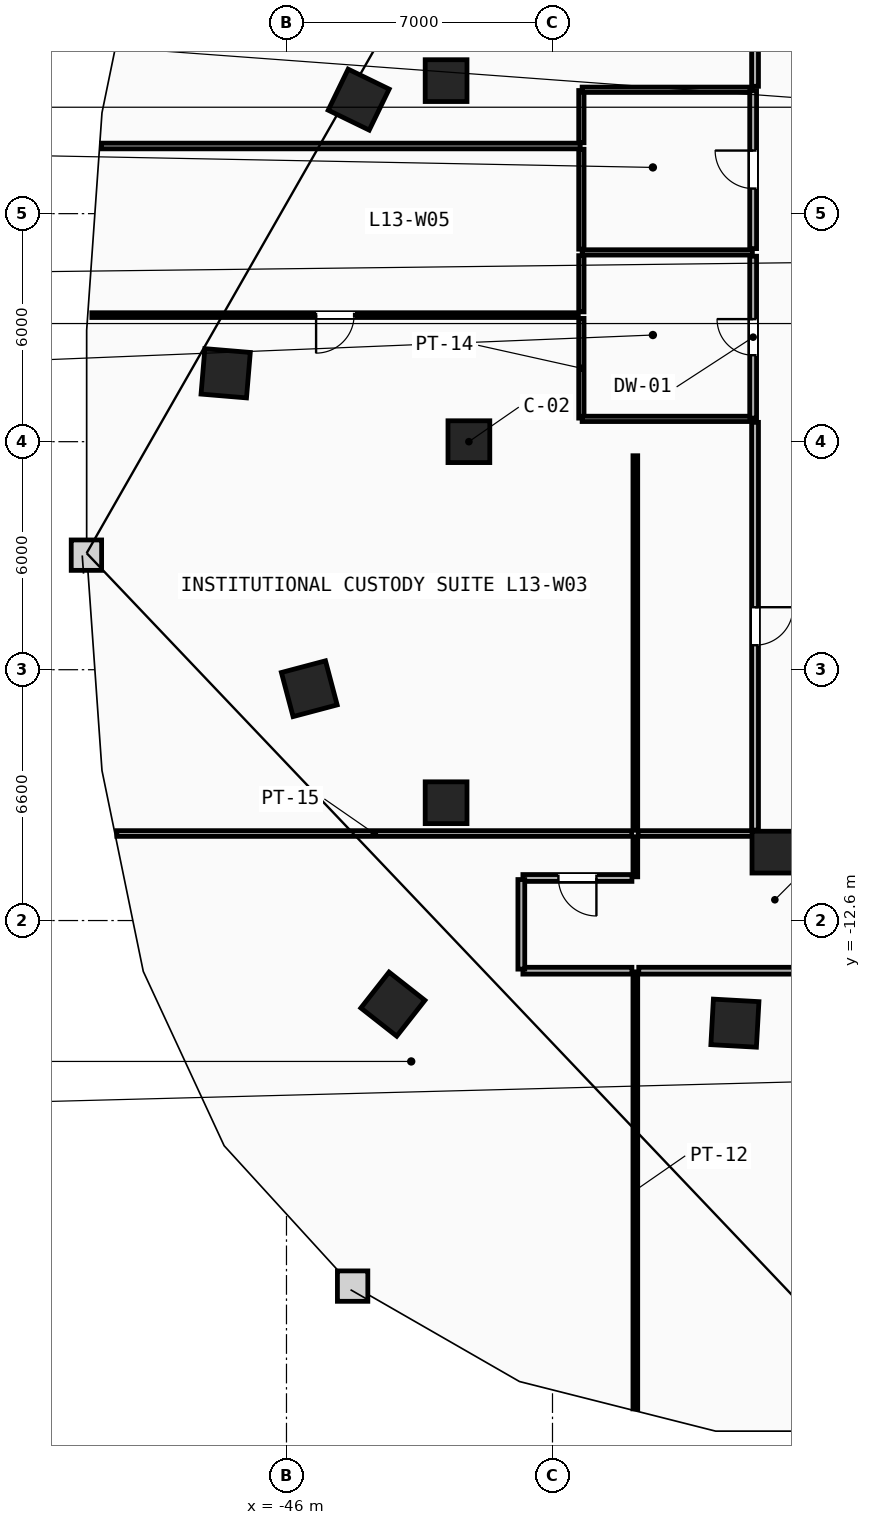
"""IFC4 building model, lengths in metres.
Left out: names, types, materials, properties, quantities, classifications, styles, units other than length and angle.
Written with IfcOpenShell. Run it as: python <this file> out.ifc"""

import sys

from ifc_helpers import new_model, si_unit, direction, frame, frame_2d, origin, origin_2d, place, context, subcontext, project, spatial, rectangle, extrude, element, fill, save


model = new_model("IFC4")
c1 = context("Model", 3, precision=1e-05, world=origin(), true_north=direction((0.0, 1.0)))
c2 = subcontext(c1, "Body", "Model", "MODEL_VIEW")
j1 = project(units=[si_unit("LENGTHUNIT", "METRE"), si_unit("PLANEANGLEUNIT", "RADIAN")], contexts=[c1])
p1 = place(None, origin())
s1 = spatial("IfcSite", under=j1, at=p1, CompositionType="ELEMENT")
p2 = place(p1, origin())
s2 = spatial("IfcBuilding", under=s1, at=p2, CompositionType="ELEMENT")
p3 = place(p2, frame((0.0, 0.0, 54.4)))
s3 = spatial("IfcBuildingStorey", under=s2, at=p3, CompositionType="ELEMENT", Elevation=54.4)
for number, where, z_axis, x_axis in (
    (1, (-41.2, 0.0, 0.0), (0.0, 0.0, 1.0), (1.0, 0.0, 0.0)),
    (2, (-41.8, 9.5, 0.0), (0.0, 0.0, 1.0), (1.0, 0.0, 0.0)),
    (3, (-41.8, -9.5, 0.0), (0.0, 0.0, 1.0), (1.0, 0.0, 0.0)),
    (4, (-33.2, -10.8, 0.0), (0.0, 0.0, 1.0), (1.0, 0.0, 0.0)),
):
    element("IfcColumn", number, at=place(p3, frame(where, z_axis=z_axis, x_axis=x_axis)), inside=s3, PredefinedType="COLUMN", context=c2, shape_type="SweptSolid", body=[
        extrude(rectangle(XDim=1.1, YDim=1.1, at=origin_2d()), origin(), (0.0, 0.0, 1.0), 3.8),
    ])
for number, where, z_axis, x_axis in (
    (5, (-44.1, 9.0, 0.0), (0.0, 0.0, 1.0), (-0.437, -0.899, 0.0)),
    (6, (-47.6, 1.8, 0.0), (0.0, 0.0, 1.0), (-0.084, -0.997, 0.0)),
    (7, (-45.4, -6.5, 0.0), (0.0, 0.0, 1.0), (0.256, -0.967, 0.0)),
    (8, (-43.2, -14.8, 0.0), (0.0, 0.0, 1.0), (0.786, -0.618, 0.0)),
    (9, (-34.2, -15.3, 0.0), (0.0, 0.0, 1.0), (0.998, -0.055, 0.0)),
):
    element("IfcColumn", number, at=place(p3, frame(where, z_axis=z_axis, x_axis=x_axis)), inside=s3, PredefinedType="COLUMN", context=c2, shape_type="SweptSolid", body=[
        extrude(rectangle(XDim=1.2, YDim=1.2, at=origin_2d()), origin(), (0.0, 0.0, 1.0), 3.8),
    ])
p4 = place(p3, frame((-38.24, 0.62, 0.0), z_axis=(0.0, 0.0, 1.0), x_axis=(0.0, 1.0, 0.0)))
e10 = element("IfcWall", 10, at=p4, inside=s3, PredefinedType="PARTITIONING", context=c2, shape_type="SweptSolid", body=[
    extrude(rectangle(XDim=2.625, YDim=0.14, at=frame_2d((1.312, 0.0))), origin(), (0.0, 0.0, 1.0), 3.5),
])
p5 = place(p3, frame((-38.24, 3.415, 0.0), z_axis=(0.0, 0.0, 1.0), x_axis=(0.0, 1.0, 0.0)))
e11 = element("IfcWall", 11, at=p5, inside=s3, PredefinedType="PARTITIONING", context=c2, shape_type="SweptSolid", body=[
    extrude(rectangle(XDim=1.48, YDim=0.14, at=frame_2d((0.74, 0.0))), origin(), (0.0, 0.0, 1.0), 3.5),
])
p6 = place(p3, frame((-38.24, 5.065, 0.0), z_axis=(0.0, 0.0, 1.0), x_axis=(0.0, 1.0, 0.0)))
e12 = element("IfcWall", 12, at=p6, inside=s3, PredefinedType="PARTITIONING", context=c2, shape_type="SweptSolid", body=[
    extrude(rectangle(XDim=2.63, YDim=0.14, at=frame_2d((1.315, 0.0))), origin(), (0.0, 0.0, 1.0), 3.5),
])
p7 = place(p3, frame((-38.24, 7.865, 0.0), z_axis=(0.0, 0.0, 1.0), x_axis=(0.0, 1.0, 0.0)))
e13 = element("IfcWall", 13, at=p7, inside=s3, PredefinedType="PARTITIONING", context=c2, shape_type="SweptSolid", body=[
    extrude(rectangle(XDim=1.375, YDim=0.14, at=frame_2d((0.688, 0.0))), origin(), (0.0, 0.0, 1.0), 3.5),
])
for number, where, z_axis, x_axis in (
    (14, (-38.22, 0.6, 0.0), (0.0, 0.0, 1.0), (1.0, 0.0, 0.0)),
    (15, (-38.22, 4.98, 0.0), (0.0, 0.0, 1.0), (1.0, 0.0, 0.0)),
    (16, (-38.22, 9.26, 0.0), (0.0, 0.0, 1.0), (1.0, 0.0, 0.0)),
):
    element("IfcWall", number, at=place(p3, frame(where, z_axis=z_axis, x_axis=x_axis)), inside=s3, PredefinedType="PARTITIONING", context=c2, shape_type="SweptSolid", body=[
        extrude(rectangle(XDim=4.48, YDim=0.14, at=frame_2d((2.24, 0.0))), origin(), (0.0, 0.0, 1.0), 3.5),
    ])
p8 = place(p3, frame((-33.72, 0.62, 0.0), z_axis=(0.0, 0.0, 1.0), x_axis=(0.0, 1.0, 0.0)))
e17 = element("IfcWall", 17, at=p8, inside=s3, PredefinedType="PARTITIONING", context=c2, shape_type="SweptSolid", body=[
    extrude(rectangle(XDim=4.26, YDim=0.18, at=frame_2d((2.13, 0.0))), origin(), (0.0, 0.0, 1.0), 3.5),
])
p9 = place(p8, frame((1.655, 0.0, 0.0)))
e18 = element("IfcOpeningElement", 18, at=p9, cuts=e17, PredefinedType="OPENING", context=c2, shape_type="SweptSolid", body=[
    extrude(rectangle(XDim=0.95, YDim=2.1, at=frame_2d((0.475, 1.05))), frame((0.0, 0.1, 0.0), z_axis=(0.0, -1.0, 0.0), x_axis=(1.0, 0.0, 0.0)), (0.0, 0.0, 1.0), 0.2),
])
p10 = place(p3, frame((-33.72, 5.08, 0.0), z_axis=(0.0, 0.0, 1.0), x_axis=(0.0, 1.0, 0.0)))
e19 = element("IfcWall", 19, at=p10, inside=s3, PredefinedType="PARTITIONING", context=c2, shape_type="SweptSolid", body=[
    extrude(rectangle(XDim=4.16, YDim=0.18, at=frame_2d((2.08, 0.0))), origin(), (0.0, 0.0, 1.0), 3.5),
])
p11 = place(p10, frame((1.58, 0.0, 0.0)))
e20 = element("IfcOpeningElement", 20, at=p11, cuts=e19, PredefinedType="OPENING", context=c2, shape_type="SweptSolid", body=[
    extrude(rectangle(XDim=1.0, YDim=2.15, at=frame_2d((0.5, 1.075))), frame((0.0, 0.1, 0.0), z_axis=(0.0, -1.0, 0.0), x_axis=(1.0, 0.0, 0.0)), (0.0, 0.0, 1.0), 0.2),
])
p12 = place(p3, frame((-36.82, -25.45, 0.0), z_axis=(0.0, 0.0, 1.0), x_axis=(0.0, 1.0, 0.0)))
e21 = element("IfcWall", 21, at=p12, inside=s3, PredefinedType="PARTITIONING", context=c2, shape_type="SweptSolid", body=[
    extrude(rectangle(XDim=11.5, YDim=0.125, at=frame_2d((5.75, 0.0))), origin(), (0.0, 0.0, 1.0), 3.5),
])
p13 = place(p3, frame((-36.82, -11.45, 0.0), z_axis=(0.0, 0.0, 1.0), x_axis=(0.0, 1.0, 0.0)))
e22 = element("IfcWall", 22, at=p13, inside=s3, PredefinedType="PARTITIONING", context=c2, shape_type="SweptSolid", body=[
    extrude(rectangle(XDim=1.055, YDim=0.125, at=frame_2d((0.527, 0.0))), origin(), (0.0, 0.0, 1.0), 3.5),
])
p14 = place(p3, frame((-36.82, -10.225, 0.0), z_axis=(0.0, 0.0, 1.0), x_axis=(0.0, 1.0, 0.0)))
e23 = element("IfcWall", 23, at=p14, inside=s3, PredefinedType="PARTITIONING", context=c2, shape_type="SweptSolid", body=[
    extrude(rectangle(XDim=9.855, YDim=0.125, at=frame_2d((4.927, 0.0))), origin(), (0.0, 0.0, 1.0), 3.5),
])
p15 = place(p3, frame((-50.464, -10.31, 0.0), z_axis=(0.0, 0.0, 1.0), x_axis=(1.0, 0.0, 0.0)))
e24 = element("IfcWall", 24, at=p15, inside=s3, PredefinedType="PARTITIONING", context=c2, shape_type="SweptSolid", body=[
    extrude(rectangle(XDim=13.549, YDim=0.15, at=frame_2d((6.774, 0.0))), origin(), (0.0, 0.0, 1.0), 2.805),
])
p16 = place(p3, frame((-36.745, -10.31, 0.0), z_axis=(0.0, 0.0, 1.0), x_axis=(1.0, 0.0, 0.0)))
e25 = element("IfcWall", 25, at=p16, inside=s3, PredefinedType="PARTITIONING", context=c2, shape_type="SweptSolid", body=[
    extrude(rectangle(XDim=3.045, YDim=0.15, at=frame_2d((1.522, 0.0))), origin(), (0.0, 0.0, 1.0), 2.805),
])
p17 = place(p3, frame((-50.866, 7.78, 0.0), z_axis=(0.0, 0.0, 1.0), x_axis=(1.0, 0.0, 0.0)))
e26 = element("IfcWall", 26, at=p17, inside=s3, PredefinedType="PARTITIONING", context=c2, shape_type="SweptSolid", body=[
    extrude(rectangle(XDim=12.596, YDim=0.15, at=frame_2d((6.298, 0.0))), origin(), (0.0, 0.0, 1.0), 3.5),
])
p18 = place(p3, frame((-36.73, -13.92, 0.0), z_axis=(0.0, 0.0, 1.0), x_axis=(1.0, 0.0, 0.0)))
e27 = element("IfcWall", 27, at=p18, inside=s3, PredefinedType="PARTITIONING", context=c2, shape_type="SweptSolid", body=[
    extrude(rectangle(XDim=11.509, YDim=0.18, at=frame_2d((5.754, 0.0))), origin(), (0.0, 0.0, 1.0), 3.5),
])
p19 = place(p18, frame((5.254, 0.0, 0.0)))
e28 = element("IfcOpeningElement", 28, at=p19, cuts=e27, PredefinedType="OPENING", context=c2, shape_type="SweptSolid", body=[
    extrude(rectangle(XDim=1.0, YDim=2.15, at=frame_2d((0.5, 1.075))), frame((0.0, 0.1, 0.0), z_axis=(0.0, -1.0, 0.0), x_axis=(1.0, 0.0, 0.0)), (0.0, 0.0, 1.0), 0.2),
])
p20 = place(p3, frame((-36.91, -11.48, 0.0), z_axis=(0.0, 0.0, 1.0), x_axis=(-1.0, 0.0, 0.0)))
e29 = element("IfcWall", 29, at=p20, inside=s3, PredefinedType="PARTITIONING", context=c2, shape_type="SweptSolid", body=[
    extrude(rectangle(XDim=2.869, YDim=0.18, at=frame_2d((1.434, 0.0))), origin(), (0.0, 0.0, 1.0), 3.5),
])
p21 = place(p20, frame((0.934, 0.0, 0.0)))
e30 = element("IfcOpeningElement", 30, at=p21, cuts=e29, PredefinedType="OPENING", context=c2, shape_type="SweptSolid", body=[
    extrude(rectangle(XDim=1.0, YDim=2.15, at=frame_2d((0.5, 1.075))), frame((0.0, 0.1, 0.0), z_axis=(0.0, -1.0, 0.0), x_axis=(1.0, 0.0, 0.0)), (0.0, 0.0, 1.0), 0.2),
])
p22 = place(p3, frame((-39.779, -13.92, 0.0), z_axis=(0.0, 0.0, 1.0), x_axis=(1.0, 0.0, 0.0)))
e31 = element("IfcWall", 31, at=p22, inside=s3, PredefinedType="PARTITIONING", context=c2, shape_type="SweptSolid", body=[
    extrude(rectangle(XDim=2.869, YDim=0.18, at=frame_2d((1.434, 0.0))), origin(), (0.0, 0.0, 1.0), 3.5),
])
p23 = place(p3, frame((-39.82, -11.521, 0.0), z_axis=(0.0, 0.0, 1.0), x_axis=(0.0, -1.0, 0.0)))
e32 = element("IfcWall", 32, at=p23, inside=s3, PredefinedType="PARTITIONING", context=c2, shape_type="SweptSolid", body=[
    extrude(rectangle(XDim=2.357, YDim=0.18, at=frame_2d((1.178, 0.0))), origin(), (0.0, 0.0, 1.0), 3.5),
])
p24 = place(p3, frame((-33.67, 0.509, 0.0), z_axis=(0.0, 0.0, 1.0), x_axis=(0.0, -1.0, 0.0)))
e33 = element("IfcWall", 33, at=p24, inside=s3, PredefinedType="PARTITIONING", context=c2, shape_type="SweptSolid", body=[
    extrude(rectangle(XDim=10.729, YDim=0.18, at=frame_2d((5.364, 0.0))), origin(), (0.0, 0.0, 1.0), 3.5),
])
p25 = place(p24, frame((4.864, 0.0, 0.0)))
e34 = element("IfcOpeningElement", 34, at=p25, cuts=e33, PredefinedType="OPENING", context=c2, shape_type="SweptSolid", body=[
    extrude(rectangle(XDim=1.0, YDim=2.15, at=frame_2d((0.5, 1.075))), frame((0.0, 0.1, 0.0), z_axis=(0.0, -1.0, 0.0), x_axis=(1.0, 0.0, 0.0)), (0.0, 0.0, 1.0), 0.2),
])
p26 = place(p3, frame((-33.67, 17.428, 0.0), z_axis=(0.0, 0.0, 1.0), x_axis=(0.0, -1.0, 0.0)))
e35 = element("IfcWall", 35, at=p26, inside=s3, PredefinedType="PARTITIONING", context=c2, shape_type="SweptSolid", body=[
    extrude(rectangle(XDim=8.077, YDim=0.18, at=frame_2d((4.039, 0.0))), origin(), (0.0, 0.0, 1.0), 3.5),
])
p27 = place(p26, frame((3.539, 0.0, 0.0)))
e36 = element("IfcOpeningElement", 36, at=p27, cuts=e35, PredefinedType="OPENING", context=c2, shape_type="SweptSolid", body=[
    extrude(rectangle(XDim=1.0, YDim=2.15, at=frame_2d((0.5, 1.075))), frame((0.0, 0.1, 0.0), z_axis=(0.0, -1.0, 0.0), x_axis=(1.0, 0.0, 0.0)), (0.0, 0.0, 1.0), 0.2),
])
p28 = place(p3, frame((-38.32, 3.33, 0.0), z_axis=(0.0, 0.0, 1.0), x_axis=(-1.0, 0.0, 0.0)))
e37 = element("IfcWall", 37, at=p28, inside=s3, PredefinedType="PARTITIONING", context=c2, shape_type="SweptSolid", body=[
    extrude(rectangle(XDim=12.801, YDim=0.125, at=frame_2d((6.401, 0.0))), origin(), (0.0, 0.0, 1.0), 3.5),
])
p29 = place(p28, frame((5.901, 0.0, 0.0)))
e38 = element("IfcOpeningElement", 38, at=p29, cuts=e37, PredefinedType="OPENING", context=c2, shape_type="SweptSolid", body=[
    extrude(rectangle(XDim=1.0, YDim=2.15, at=frame_2d((0.5, 1.075))), frame((0.0, 0.073, 0.0), z_axis=(0.0, -1.0, 0.0), x_axis=(1.0, 0.0, 0.0)), (0.0, 0.0, 1.0), 0.145),
])
p30 = place(p29, origin())
e39 = element("IfcDoor", 39, at=p30, inside=s3, OperationType="SINGLE_SWING_RIGHT", PredefinedType="DOOR", context=c2, shape_type="SweptSolid", body=[
    extrude(rectangle(XDim=1.0, YDim=2.15, at=frame_2d((0.5, 1.075))), frame((0.0, 0.025, 0.0), z_axis=(0.0, -1.0, 0.0), x_axis=(1.0, 0.0, 0.0)), (0.0, 0.0, 1.0), 0.05),
])
fill(e38, e39)
p31 = place(p25, origin())
e40 = element("IfcDoor", 40, at=p31, inside=s3, OperationType="SINGLE_SWING_LEFT", PredefinedType="DOOR", context=c2, shape_type="SweptSolid", body=[
    extrude(rectangle(XDim=1.0, YDim=2.15, at=frame_2d((0.5, 1.075))), frame((0.0, 0.025, 0.0), z_axis=(0.0, -1.0, 0.0), x_axis=(1.0, 0.0, 0.0)), (0.0, 0.0, 1.0), 0.05),
])
fill(e34, e40)
p32 = place(p9, origin())
e41 = element("IfcDoor", 41, at=p32, inside=s3, OperationType="SINGLE_SWING_RIGHT", PredefinedType="DOOR", context=c2, shape_type="SweptSolid", body=[
    extrude(rectangle(XDim=0.95, YDim=2.1, at=frame_2d((0.475, 1.05))), frame((0.0, 0.025, 0.0), z_axis=(0.0, -1.0, 0.0), x_axis=(1.0, 0.0, 0.0)), (0.0, 0.0, 1.0), 0.05),
])
fill(e18, e41)
p33 = place(p11, origin())
e42 = element("IfcDoor", 42, at=p33, inside=s3, OperationType="SINGLE_SWING_RIGHT", PredefinedType="DOOR", context=c2, shape_type="SweptSolid", body=[
    extrude(rectangle(XDim=1.0, YDim=2.15, at=frame_2d((0.5, 1.075))), frame((0.0, 0.025, 0.0), z_axis=(0.0, -1.0, 0.0), x_axis=(1.0, 0.0, 0.0)), (0.0, 0.0, 1.0), 0.05),
])
fill(e20, e42)
p34 = place(p21, origin())
e43 = element("IfcDoor", 43, at=p34, inside=s3, OperationType="SINGLE_SWING_LEFT", PredefinedType="DOOR", context=c2, shape_type="SweptSolid", body=[
    extrude(rectangle(XDim=1.0, YDim=2.15, at=frame_2d((0.5, 1.075))), frame((0.0, 0.025, 0.0), z_axis=(0.0, -1.0, 0.0), x_axis=(1.0, 0.0, 0.0)), (0.0, 0.0, 1.0), 0.05),
])
fill(e30, e43)
save(model, sys.argv[1])
